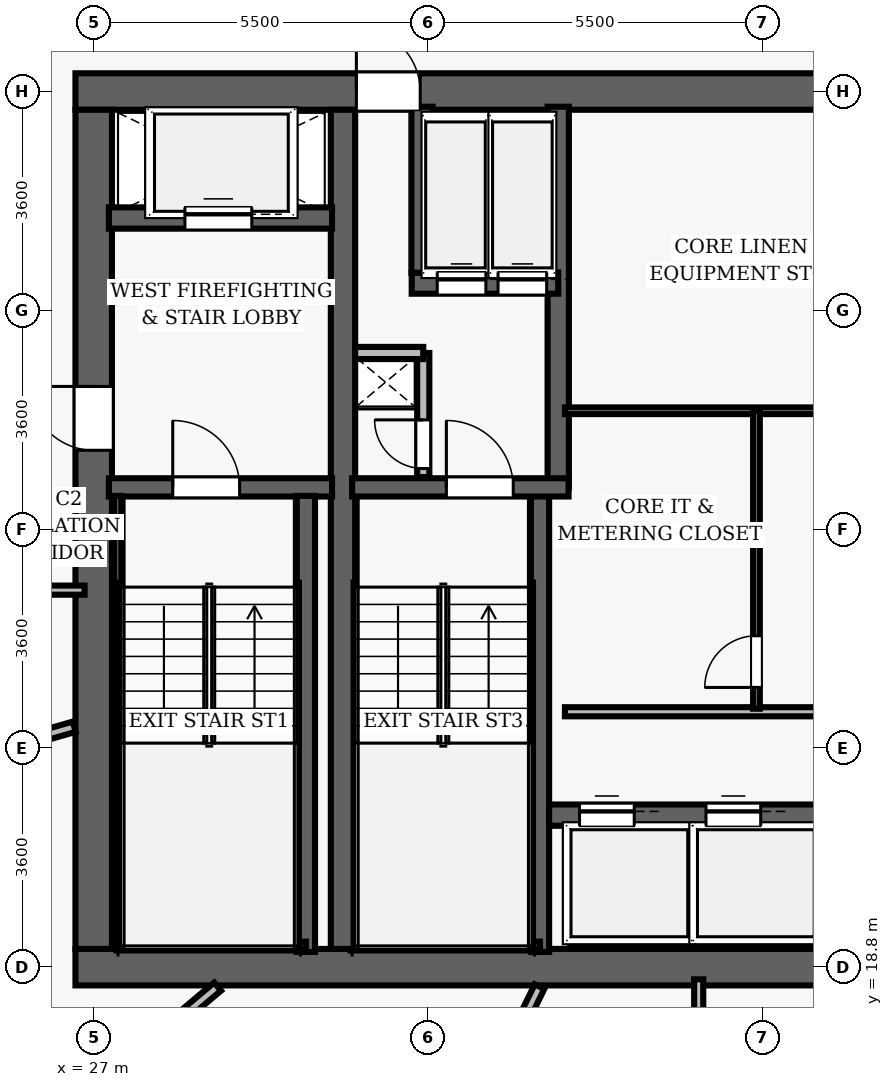
"""IFC4 building model, lengths in metres.
Left out: names, types, materials, properties, quantities, classifications, styles, units other than length and angle.
Written with IfcOpenShell. Run it as: python <this file> out.ifc"""

import sys

from ifc_helpers import new_model, si_unit, direction, frame, frame_2d, origin, place, context, subcontext, project, spatial, rectangle, extrude, element, fill, save


model = new_model("IFC4")
c1 = context("Model", 3, precision=1e-05, world=origin(), true_north=direction((0.0, 1.0)))
c2 = subcontext(c1, "Body", "Model", "MODEL_VIEW")
j1 = project(units=[si_unit("LENGTHUNIT", "METRE"), si_unit("PLANEANGLEUNIT", "RADIAN")], contexts=[c1])
p1 = place(None, origin())
s1 = spatial("IfcSite", under=j1, at=p1, CompositionType="ELEMENT")
p2 = place(p1, origin())
s2 = spatial("IfcBuilding", under=s1, at=p2, CompositionType="ELEMENT")
p3 = place(p2, frame((0.0, 0.0, 148.3)))
s3 = spatial("IfcBuildingStorey", under=s2, at=p3, CompositionType="ELEMENT", Elevation=148.3)
p4 = place(p3, frame((26.7, 18.8, 0.0), z_axis=(0.0, 0.0, 1.0), x_axis=(1.0, 0.0, 0.0)))
e1 = element("IfcWall", 1, at=p4, inside=s3, PredefinedType="SHEAR", context=c2, shape_type="SweptSolid", body=[
    extrude(rectangle(XDim=22.6, YDim=0.6, at=frame_2d((11.3, 0.0))), origin(), (0.0, 0.0, 1.0), 3.5),
])
p5 = place(p4, frame((14.52, 0.0, 0.0)))
e2 = element("IfcOpeningElement", 2, at=p5, cuts=e1, PredefinedType="OPENING", context=c2, shape_type="SweptSolid", body=[
    extrude(rectangle(XDim=1.05, YDim=2.15, at=frame_2d((0.525, 1.075))), frame((0.0, 0.31, 0.0), z_axis=(0.0, -1.0, 0.0), x_axis=(1.0, 0.0, 0.0)), (0.0, 0.0, 1.0), 0.62),
])
p6 = place(p3, frame((26.7, 33.2, 0.0), z_axis=(0.0, 0.0, 1.0), x_axis=(1.0, 0.0, 0.0)))
e3 = element("IfcWall", 3, at=p6, inside=s3, PredefinedType="SHEAR", context=c2, shape_type="SweptSolid", body=[
    extrude(rectangle(XDim=22.6, YDim=0.6, at=frame_2d((11.3, 0.0))), origin(), (0.0, 0.0, 1.0), 3.5),
])
p7 = place(p6, frame((4.62, 0.0, 0.0)))
e4 = element("IfcOpeningElement", 4, at=p7, cuts=e3, PredefinedType="OPENING", context=c2, shape_type="SweptSolid", body=[
    extrude(rectangle(XDim=1.05, YDim=2.15, at=frame_2d((0.525, 1.075))), frame((0.0, 0.31, 0.0), z_axis=(0.0, -1.0, 0.0), x_axis=(1.0, 0.0, 0.0)), (0.0, 0.0, 1.0), 0.62),
])
p8 = place(p6, frame((14.52, 0.0, 0.0)))
e5 = element("IfcOpeningElement", 5, at=p8, cuts=e3, PredefinedType="OPENING", context=c2, shape_type="SweptSolid", body=[
    extrude(rectangle(XDim=1.05, YDim=2.15, at=frame_2d((0.525, 1.075))), frame((0.0, 0.31, 0.0), z_axis=(0.0, -1.0, 0.0), x_axis=(1.0, 0.0, 0.0)), (0.0, 0.0, 1.0), 0.62),
])
p9 = place(p3, frame((27.0, 19.1, 0.0), z_axis=(0.0, 0.0, 1.0), x_axis=(0.0, 1.0, 0.0)))
e6 = element("IfcWall", 6, at=p9, inside=s3, PredefinedType="SHEAR", context=c2, shape_type="SweptSolid", body=[
    extrude(rectangle(XDim=13.8, YDim=0.6, at=frame_2d((6.9, 0.0))), origin(), (0.0, 0.0, 1.0), 3.5),
])
p10 = place(p9, frame((8.2, 0.0, 0.0)))
e7 = element("IfcOpeningElement", 7, at=p10, cuts=e6, PredefinedType="OPENING", context=c2, shape_type="SweptSolid", body=[
    extrude(rectangle(XDim=1.05, YDim=2.15, at=frame_2d((0.525, 1.075))), frame((0.0, 0.31, 0.0), z_axis=(0.0, -1.0, 0.0), x_axis=(1.0, 0.0, 0.0)), (0.0, 0.0, 1.0), 0.62),
])
p11 = place(p3, frame((31.1, 19.1, 0.0), z_axis=(0.0, 0.0, 1.0), x_axis=(0.0, 1.0, 0.0)))
e8 = element("IfcWall", 8, at=p11, inside=s3, PredefinedType="SHEAR", context=c2, shape_type="SweptSolid", body=[
    extrude(rectangle(XDim=13.8, YDim=0.4, at=frame_2d((6.9, 0.0))), origin(), (0.0, 0.0, 1.0), 3.5),
])
p12 = place(p3, frame((27.25, 26.69, 0.0), z_axis=(0.0, 0.0, 1.0), x_axis=(1.0, 0.0, 0.0)))
e9 = element("IfcWall", 9, at=p12, inside=s3, PredefinedType="SHEAR", context=c2, shape_type="SweptSolid", body=[
    extrude(rectangle(XDim=3.67, YDim=0.3, at=frame_2d((1.835, 0.0))), origin(), (0.0, 0.0, 1.0), 3.5),
])
p13 = place(p12, frame((1.05, 0.0, 0.0)))
e10 = element("IfcOpeningElement", 10, at=p13, cuts=e9, PredefinedType="OPENING", context=c2, shape_type="SweptSolid", body=[
    extrude(rectangle(XDim=1.1, YDim=2.15, at=frame_2d((0.55, 1.075))), frame((0.0, 0.16, 0.0), z_axis=(0.0, -1.0, 0.0), x_axis=(1.0, 0.0, 0.0)), (0.0, 0.0, 1.0), 0.32),
])
p14 = place(p3, frame((30.49, 19.05, 0.0), z_axis=(0.0, 0.0, 1.0), x_axis=(0.0, 1.0, 0.0)))
e11 = element("IfcWall", 11, at=p14, inside=s3, PredefinedType="SHEAR", context=c2, shape_type="SweptSolid", body=[
    extrude(rectangle(XDim=7.5, YDim=0.3, at=frame_2d((3.75, 0.0))), origin(), (0.0, 0.0, 1.0), 3.5),
])
p15 = place(p3, frame((27.395, 19.1, 0.0), z_axis=(0.0, 0.0, 1.0), x_axis=(0.0, 1.0, 0.0)))
e12 = element("IfcWall", 12, at=p15, inside=s3, PredefinedType="SHEAR", context=c2, shape_type="SweptSolid", body=[
    extrude(rectangle(XDim=7.45, YDim=0.12, at=frame_2d((3.725, 0.0))), origin(), (0.0, 0.0, 1.0), 3.5),
])
p16 = place(p3, frame((27.395, 19.16, 0.0), z_axis=(0.0, 0.0, 1.0), x_axis=(1.0, 0.0, 0.0)))
e13 = element("IfcWall", 13, at=p16, inside=s3, PredefinedType="SHEAR", context=c2, shape_type="SweptSolid", body=[
    extrude(rectangle(XDim=3.095, YDim=0.12, at=frame_2d((1.547, 0.0))), origin(), (0.0, 0.0, 1.0), 3.5),
])
p17 = place(p3, frame((27.25, 31.12, 0.0), z_axis=(0.0, 0.0, 1.0), x_axis=(1.0, 0.0, 0.0)))
e14 = element("IfcWall", 14, at=p17, inside=s3, PredefinedType="SHEAR", context=c2, shape_type="SweptSolid", body=[
    extrude(rectangle(XDim=3.67, YDim=0.35, at=frame_2d((1.835, 0.0))), origin(), (0.0, 0.0, 1.0), 2.675),
])
p18 = place(p17, frame((1.25, 0.0, 0.0)))
e15 = element("IfcOpeningElement", 15, at=p18, cuts=e14, PredefinedType="OPENING", context=c2, shape_type="SweptSolid", body=[
    extrude(rectangle(XDim=1.1, YDim=2.15, at=frame_2d((0.55, 1.075))), frame((0.0, 0.185, 0.0), z_axis=(0.0, -1.0, 0.0), x_axis=(1.0, 0.0, 0.0)), (0.0, 0.0, 1.0), 0.37),
])
p19 = place(p3, frame((34.34, 19.05, 0.0), z_axis=(0.0, 0.0, 1.0), x_axis=(0.0, 1.0, 0.0)))
e16 = element("IfcWall", 16, at=p19, inside=s3, PredefinedType="SHEAR", context=c2, shape_type="SweptSolid", body=[
    extrude(rectangle(XDim=7.5, YDim=0.3, at=frame_2d((3.75, 0.0))), origin(), (0.0, 0.0, 1.0), 3.5),
])
p20 = place(p3, frame((34.64, 26.69, 0.0), z_axis=(0.0, 0.0, 1.0), x_axis=(0.0, 1.0, 0.0)))
e17 = element("IfcWall", 17, at=p20, inside=s3, PredefinedType="SHEAR", context=c2, shape_type="SweptSolid", body=[
    extrude(rectangle(XDim=6.26, YDim=0.35, at=frame_2d((3.13, 0.0))), origin(), (0.0, 0.0, 1.0), 3.5),
])
p21 = place(p3, frame((31.25, 26.69, 0.0), z_axis=(0.0, 0.0, 1.0), x_axis=(1.0, 0.0, 0.0)))
e18 = element("IfcWall", 18, at=p21, inside=s3, PredefinedType="SHEAR", context=c2, shape_type="SweptSolid", body=[
    extrude(rectangle(XDim=3.56, YDim=0.3, at=frame_2d((1.78, 0.0))), origin(), (0.0, 0.0, 1.0), 3.5),
])
p22 = place(p21, frame((1.55, 0.0, 0.0)))
e19 = element("IfcOpeningElement", 19, at=p22, cuts=e18, PredefinedType="OPENING", context=c2, shape_type="SweptSolid", body=[
    extrude(rectangle(XDim=1.1, YDim=2.15, at=frame_2d((0.55, 1.075))), frame((0.0, 0.16, 0.0), z_axis=(0.0, -1.0, 0.0), x_axis=(1.0, 0.0, 0.0)), (0.0, 0.0, 1.0), 0.32),
])
p23 = place(p3, frame((31.3, 19.16, 0.0), z_axis=(0.0, 0.0, 1.0), x_axis=(1.0, 0.0, 0.0)))
e20 = element("IfcWall", 20, at=p23, inside=s3, PredefinedType="SHEAR", context=c2, shape_type="SweptSolid", body=[
    extrude(rectangle(XDim=3.04, YDim=0.12, at=frame_2d((1.52, 0.0))), origin(), (0.0, 0.0, 1.0), 3.5),
])
p24 = place(p3, frame((32.23, 30.05, 0.0), z_axis=(0.0, 0.0, 1.0), x_axis=(1.0, 0.0, 0.0)))
e21 = element("IfcWall", 21, at=p24, inside=s3, PredefinedType="SHEAR", context=c2, shape_type="SweptSolid", body=[
    extrude(rectangle(XDim=2.41, YDim=0.35, at=frame_2d((1.205, 0.0))), origin(), (0.0, 0.0, 1.0), 2.675),
])
p25 = place(p24, frame((0.42, 0.0, 0.0)))
e22 = element("IfcOpeningElement", 22, at=p25, cuts=e21, PredefinedType="OPENING", context=c2, shape_type="SweptSolid", body=[
    extrude(rectangle(XDim=0.8, YDim=2.15, at=frame_2d((0.4, 1.075))), frame((0.0, 0.185, 0.0), z_axis=(0.0, -1.0, 0.0), x_axis=(1.0, 0.0, 0.0)), (0.0, 0.0, 1.0), 0.37),
])
p26 = place(p24, frame((1.42, 0.0, 0.0)))
e23 = element("IfcOpeningElement", 23, at=p26, cuts=e21, PredefinedType="OPENING", context=c2, shape_type="SweptSolid", body=[
    extrude(rectangle(XDim=0.8, YDim=2.15, at=frame_2d((0.4, 1.075))), frame((0.0, 0.185, 0.0), z_axis=(0.0, -1.0, 0.0), x_axis=(1.0, 0.0, 0.0)), (0.0, 0.0, 1.0), 0.37),
])
p27 = place(p3, frame((32.4, 30.22, 0.0), z_axis=(0.0, 0.0, 1.0), x_axis=(0.0, 1.0, 0.0)))
e24 = element("IfcWall", 24, at=p27, inside=s3, PredefinedType="SHEAR", context=c2, shape_type="SweptSolid", body=[
    extrude(rectangle(XDim=2.73, YDim=0.35, at=frame_2d((1.365, 0.0))), origin(), (0.0, 0.0, 1.0), 2.675),
])
p28 = place(p3, frame((32.42, 26.86, 0.0), z_axis=(0.0, 0.0, 1.0), x_axis=(0.0, 1.0, 0.0)))
e25 = element("IfcWall", 25, at=p28, inside=s3, PredefinedType="PARTITIONING", context=c2, shape_type="SweptSolid", body=[
    extrude(rectangle(XDim=2.04, YDim=0.2, at=frame_2d((1.02, 0.0))), origin(), (0.0, 0.0, 1.0), 2.675),
])
p29 = place(p28, frame((0.14, 0.0, 0.0)))
e26 = element("IfcOpeningElement", 26, at=p29, cuts=e25, PredefinedType="OPENING", context=c2, shape_type="SweptSolid", body=[
    extrude(rectangle(XDim=0.8, YDim=2.05, at=frame_2d((0.4, 1.025))), frame((0.0, 0.11, 0.0), z_axis=(0.0, -1.0, 0.0), x_axis=(1.0, 0.0, 0.0)), (0.0, 0.0, 1.0), 0.22),
])
p30 = place(p3, frame((31.3, 28.9, 0.0), z_axis=(0.0, 0.0, 1.0), x_axis=(1.0, 0.0, 0.0)))
e27 = element("IfcWall", 27, at=p30, inside=s3, PredefinedType="PARTITIONING", context=c2, shape_type="SweptSolid", body=[
    extrude(rectangle(XDim=1.12, YDim=0.2, at=frame_2d((0.56, 0.0))), origin(), (0.0, 0.0, 1.0), 2.675),
])
p31 = place(p3, frame((34.49, 21.3, 0.0), z_axis=(0.0, 0.0, 1.0), x_axis=(1.0, 0.0, 0.0)))
e28 = element("IfcWall", 28, at=p31, inside=s3, PredefinedType="SHEAR", context=c2, shape_type="SweptSolid", body=[
    extrude(rectangle(XDim=6.68, YDim=0.35, at=frame_2d((3.34, 0.0))), origin(), (0.0, 0.0, 1.0), 2.675),
])
p32 = place(p31, frame((0.5, 0.0, 0.0)))
e29 = element("IfcOpeningElement", 29, at=p32, cuts=e28, PredefinedType="OPENING", context=c2, shape_type="SweptSolid", body=[
    extrude(rectangle(XDim=0.9, YDim=2.15, at=frame_2d((0.45, 1.075))), frame((0.0, 0.185, 0.0), z_axis=(0.0, -1.0, 0.0), x_axis=(1.0, 0.0, 0.0)), (0.0, 0.0, 1.0), 0.37),
])
p33 = place(p31, frame((2.58, 0.0, 0.0)))
e30 = element("IfcOpeningElement", 30, at=p33, cuts=e28, PredefinedType="OPENING", context=c2, shape_type="SweptSolid", body=[
    extrude(rectangle(XDim=0.9, YDim=2.15, at=frame_2d((0.45, 1.075))), frame((0.0, 0.185, 0.0), z_axis=(0.0, -1.0, 0.0), x_axis=(1.0, 0.0, 0.0)), (0.0, 0.0, 1.0), 0.37),
])
p34 = place(p31, frame((4.66, 0.0, 0.0)))
e31 = element("IfcOpeningElement", 31, at=p34, cuts=e28, PredefinedType="OPENING", context=c2, shape_type="SweptSolid", body=[
    extrude(rectangle(XDim=0.9, YDim=2.15, at=frame_2d((0.45, 1.075))), frame((0.0, 0.185, 0.0), z_axis=(0.0, -1.0, 0.0), x_axis=(1.0, 0.0, 0.0)), (0.0, 0.0, 1.0), 0.37),
])
p35 = place(p3, frame((34.75, 23.0, 0.0), z_axis=(0.0, 0.0, 1.0), x_axis=(1.0, 0.0, 0.0)))
e32 = element("IfcWall", 32, at=p35, inside=s3, PredefinedType="PARTITIONING", context=c2, shape_type="SweptSolid", body=[
    extrude(rectangle(XDim=6.25, YDim=0.15, at=frame_2d((3.125, 0.0))), origin(), (0.0, 0.0, 1.0), 2.675),
])
p36 = place(p3, frame((34.75, 27.95, 0.0), z_axis=(0.0, 0.0, 1.0), x_axis=(1.0, 0.0, 0.0)))
e33 = element("IfcWall", 33, at=p36, inside=s3, PredefinedType="PARTITIONING", context=c2, shape_type="SweptSolid", body=[
    extrude(rectangle(XDim=6.25, YDim=0.11, at=frame_2d((3.125, 0.0))), origin(), (0.0, 0.0, 1.0), 2.675),
])
p37 = place(p3, frame((37.9, 23.05, 0.0), z_axis=(0.0, 0.0, 1.0), x_axis=(0.0, 1.0, 0.0)))
e34 = element("IfcWall", 34, at=p37, inside=s3, PredefinedType="PARTITIONING", context=c2, shape_type="SweptSolid", body=[
    extrude(rectangle(XDim=4.9, YDim=0.11, at=frame_2d((2.45, 0.0))), origin(), (0.0, 0.0, 1.0), 2.675),
])
p38 = place(p37, frame((0.35, 0.0, 0.0)))
e35 = element("IfcOpeningElement", 35, at=p38, cuts=e34, PredefinedType="OPENING", context=c2, shape_type="SweptSolid", body=[
    extrude(rectangle(XDim=0.85, YDim=2.1, at=frame_2d((0.425, 1.05))), frame((0.0, 0.065, 0.0), z_axis=(0.0, -1.0, 0.0), x_axis=(1.0, 0.0, 0.0)), (0.0, 0.0, 1.0), 0.13),
])
p39 = place(p3, frame((14.5, 25.0, 0.0), z_axis=(0.0, 0.0, 1.0), x_axis=(1.0, 0.0, 0.0)))
e36 = element("IfcWall", 36, at=p39, inside=s3, PredefinedType="PARTITIONING", context=c2, shape_type="SweptSolid", body=[
    extrude(rectangle(XDim=12.35, YDim=0.15, at=frame_2d((6.175, 0.0))), origin(), (0.0, 0.0, 1.0), 2.675),
])
p40 = place(p39, frame((8.788, 0.0, 0.0)))
e37 = element("IfcOpeningElement", 37, at=p40, cuts=e36, PredefinedType="OPENING", context=c2, shape_type="SweptSolid", body=[
    extrude(rectangle(XDim=0.95, YDim=2.15, at=frame_2d((0.475, 1.075))), frame((0.0, 0.085, 0.0), z_axis=(0.0, -1.0, 0.0), x_axis=(1.0, 0.0, 0.0)), (0.0, 0.0, 1.0), 0.17),
])
p41 = place(p3, frame((36.95, 11.2, 0.0), z_axis=(0.0, 0.0, 1.0), x_axis=(0.0, 1.0, 0.0)))
e38 = element("IfcWall", 38, at=p41, inside=s3, PredefinedType="PARTITIONING", context=c2, shape_type="SweptSolid", body=[
    extrude(rectangle(XDim=7.4, YDim=0.15, at=frame_2d((3.7, 0.0))), origin(), (0.0, 0.0, 1.0), 2.675),
])
p42 = place(p41, frame((5.075, 0.0, 0.0)))
e39 = element("IfcOpeningElement", 39, at=p42, cuts=e38, PredefinedType="OPENING", context=c2, shape_type="SweptSolid", body=[
    extrude(rectangle(XDim=0.95, YDim=2.15, at=frame_2d((0.475, 1.075))), frame((0.0, 0.085, 0.0), z_axis=(0.0, -1.0, 0.0), x_axis=(1.0, 0.0, 0.0)), (0.0, 0.0, 1.0), 0.17),
])
p43 = place(p3, frame((26.68, 22.754, 0.0), z_axis=(0.0, 0.0, 1.0), x_axis=(-0.96126584255, -0.275622894454, 0.0)))
e40 = element("IfcWall", 40, at=p43, inside=s3, PredefinedType="PARTITIONING", context=c2, shape_type="SweptSolid", body=[
    extrude(rectangle(XDim=13.586, YDim=0.175, at=frame_2d((6.793, 0.0))), origin(), (0.0, 0.0, 1.0), 2.675),
])
p44 = place(p3, frame((29.038, 18.48, 0.0), z_axis=(0.0, 0.0, 1.0), x_axis=(-0.766047971117, -0.642783405159, 0.0)))
e41 = element("IfcWall", 41, at=p44, inside=s3, PredefinedType="PARTITIONING", context=c2, shape_type="SweptSolid", body=[
    extrude(rectangle(XDim=11.939, YDim=0.175, at=frame_2d((5.97, 0.0))), origin(), (0.0, 0.0, 1.0), 2.675),
])
p45 = place(p3, frame((34.332, 18.48, 0.0), z_axis=(0.0, 0.0, 1.0), x_axis=(-0.438373347789, -0.898792972797, 0.0)))
e42 = element("IfcWall", 42, at=p45, inside=s3, PredefinedType="PARTITIONING", context=c2, shape_type="SweptSolid", body=[
    extrude(rectangle(XDim=14.54, YDim=0.175, at=frame_2d((7.27, 0.0))), origin(), (0.0, 0.0, 1.0), 2.675),
])
p46 = place(p13, origin())
e43 = element("IfcDoor", 43, at=p46, inside=s3, OperationType="SINGLE_SWING_LEFT", PredefinedType="DOOR", context=c2, shape_type="SweptSolid", body=[
    extrude(rectangle(XDim=1.1, YDim=2.15, at=frame_2d((0.55, 1.075))), frame((0.0, 0.025, 0.0), z_axis=(0.0, -1.0, 0.0), x_axis=(1.0, 0.0, 0.0)), (0.0, 0.0, 1.0), 0.05),
])
fill(e10, e43)
p47 = place(p10, origin())
e44 = element("IfcDoor", 44, at=p47, inside=s3, OperationType="SINGLE_SWING_RIGHT", PredefinedType="DOOR", context=c2, shape_type="SweptSolid", body=[
    extrude(rectangle(XDim=1.05, YDim=2.15, at=frame_2d((0.525, 1.075))), frame((0.0, 0.025, 0.0), z_axis=(0.0, -1.0, 0.0), x_axis=(1.0, 0.0, 0.0)), (0.0, 0.0, 1.0), 0.05),
])
fill(e7, e44)
p48 = place(p22, origin())
e45 = element("IfcDoor", 45, at=p48, inside=s3, OperationType="SINGLE_SWING_LEFT", PredefinedType="DOOR", context=c2, shape_type="SweptSolid", body=[
    extrude(rectangle(XDim=1.1, YDim=2.15, at=frame_2d((0.55, 1.075))), frame((0.0, 0.025, 0.0), z_axis=(0.0, -1.0, 0.0), x_axis=(1.0, 0.0, 0.0)), (0.0, 0.0, 1.0), 0.05),
])
fill(e19, e45)
p49 = place(p29, origin())
e46 = element("IfcDoor", 46, at=p49, inside=s3, OperationType="SINGLE_SWING_RIGHT", PredefinedType="DOOR", context=c2, shape_type="SweptSolid", body=[
    extrude(rectangle(XDim=0.8, YDim=2.05, at=frame_2d((0.4, 1.025))), frame((0.0, 0.025, 0.0), z_axis=(0.0, -1.0, 0.0), x_axis=(1.0, 0.0, 0.0)), (0.0, 0.0, 1.0), 0.05),
])
fill(e26, e46)
p50 = place(p7, origin())
e47 = element("IfcDoor", 47, at=p50, inside=s3, OperationType="SINGLE_SWING_LEFT", PredefinedType="DOOR", context=c2, shape_type="SweptSolid", body=[
    extrude(rectangle(XDim=1.05, YDim=2.15, at=frame_2d((0.525, 1.075))), frame((0.0, 0.025, 0.0), z_axis=(0.0, -1.0, 0.0), x_axis=(1.0, 0.0, 0.0)), (0.0, 0.0, 1.0), 0.05),
])
fill(e4, e47)
p51 = place(p38, origin())
e48 = element("IfcDoor", 48, at=p51, inside=s3, OperationType="SINGLE_SWING_LEFT", PredefinedType="DOOR", context=c2, shape_type="SweptSolid", body=[
    extrude(rectangle(XDim=0.85, YDim=2.1, at=frame_2d((0.425, 1.05))), frame((0.0, 0.025, 0.0), z_axis=(0.0, -1.0, 0.0), x_axis=(1.0, 0.0, 0.0)), (0.0, 0.0, 1.0), 0.05),
])
fill(e35, e48)
p52 = place(p32, origin())
e49 = element("IfcDoor", 49, at=p52, inside=s3, OperationType="SLIDING_TO_LEFT", PredefinedType="DOOR", context=c2, shape_type="SweptSolid", body=[
    extrude(rectangle(XDim=0.9, YDim=2.15, at=frame_2d((0.45, 1.075))), frame((0.0, 0.025, 0.0), z_axis=(0.0, -1.0, 0.0), x_axis=(1.0, 0.0, 0.0)), (0.0, 0.0, 1.0), 0.05),
])
fill(e29, e49)
p53 = place(p33, origin())
e50 = element("IfcDoor", 50, at=p53, inside=s3, OperationType="SLIDING_TO_LEFT", PredefinedType="DOOR", context=c2, shape_type="SweptSolid", body=[
    extrude(rectangle(XDim=0.9, YDim=2.15, at=frame_2d((0.45, 1.075))), frame((0.0, 0.025, 0.0), z_axis=(0.0, -1.0, 0.0), x_axis=(1.0, 0.0, 0.0)), (0.0, 0.0, 1.0), 0.05),
])
fill(e30, e50)
p54 = place(p18, origin())
e51 = element("IfcDoor", 51, at=p54, inside=s3, OperationType="SLIDING_TO_LEFT", PredefinedType="DOOR", context=c2, shape_type="SweptSolid", body=[
    extrude(rectangle(XDim=1.1, YDim=2.15, at=frame_2d((0.55, 1.075))), frame((0.0, 0.025, 0.0), z_axis=(0.0, -1.0, 0.0), x_axis=(1.0, 0.0, 0.0)), (0.0, 0.0, 1.0), 0.05),
])
fill(e15, e51)
p55 = place(p25, origin())
e52 = element("IfcDoor", 52, at=p55, inside=s3, OperationType="SLIDING_TO_LEFT", PredefinedType="DOOR", context=c2, shape_type="SweptSolid", body=[
    extrude(rectangle(XDim=0.8, YDim=2.15, at=frame_2d((0.4, 1.075))), frame((0.0, 0.025, 0.0), z_axis=(0.0, -1.0, 0.0), x_axis=(1.0, 0.0, 0.0)), (0.0, 0.0, 1.0), 0.05),
])
fill(e22, e52)
p56 = place(p26, origin())
e53 = element("IfcDoor", 53, at=p56, inside=s3, OperationType="SLIDING_TO_LEFT", PredefinedType="DOOR", context=c2, shape_type="SweptSolid", body=[
    extrude(rectangle(XDim=0.8, YDim=2.15, at=frame_2d((0.4, 1.075))), frame((0.0, 0.025, 0.0), z_axis=(0.0, -1.0, 0.0), x_axis=(1.0, 0.0, 0.0)), (0.0, 0.0, 1.0), 0.05),
])
fill(e23, e53)
save(model, sys.argv[1])
